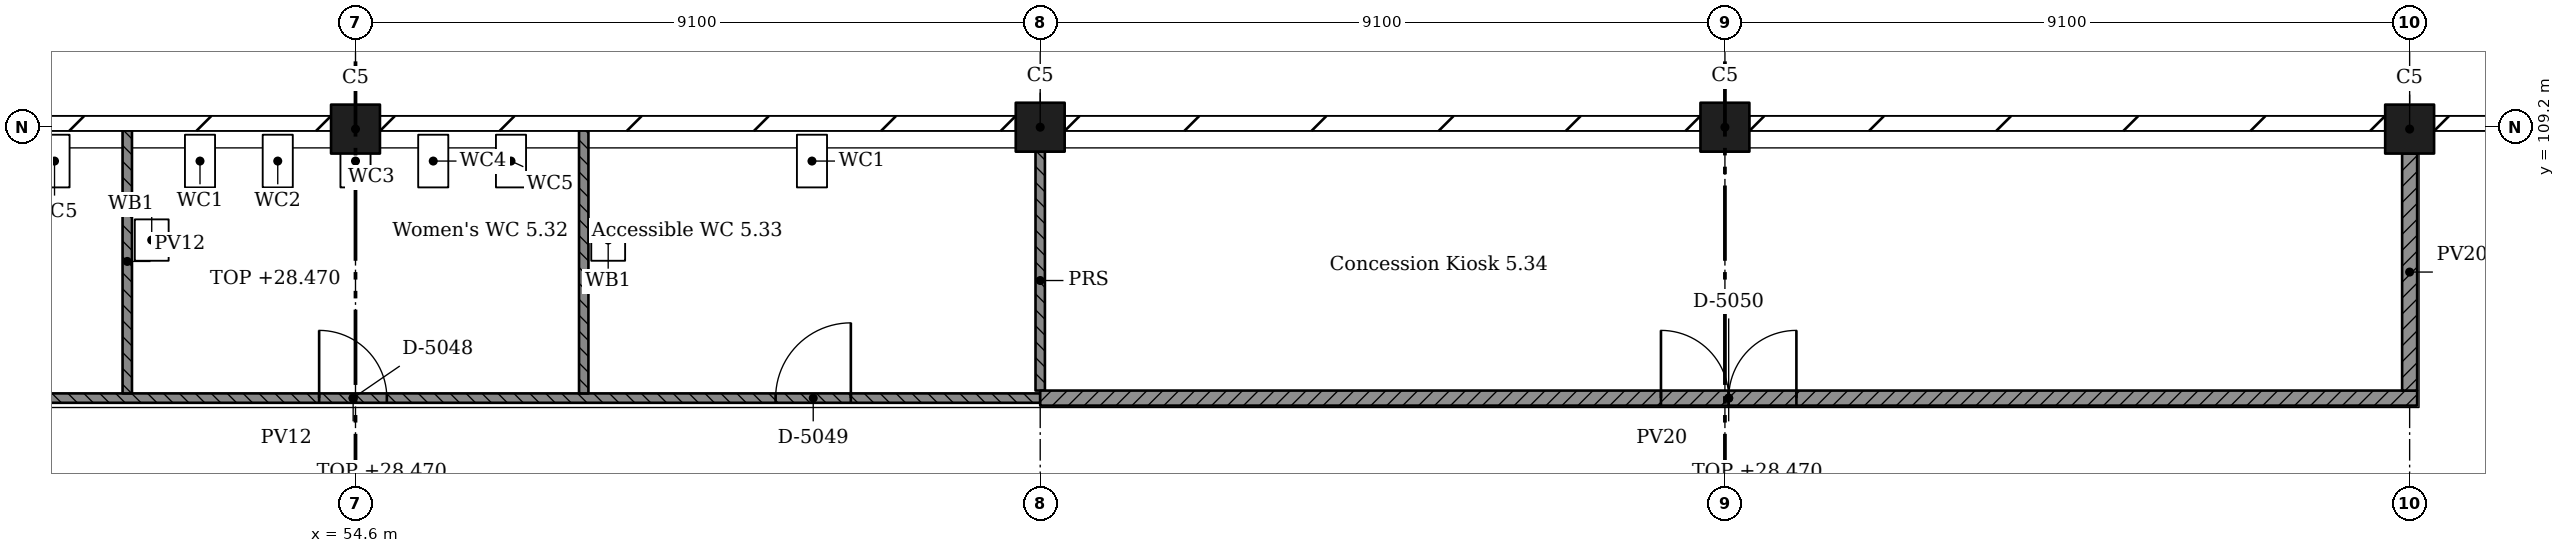
"""IFC4 building model, lengths in metres.
Left out: names, types, materials, properties, quantities, classifications, styles, units other than length and angle.
Written with IfcOpenShell. Run it as: python <this file> out.ifc"""

import sys

from ifc_helpers import new_model, si_unit, direction, frame, frame_2d, origin, origin_2d, place, context, subcontext, project, spatial, rectangle, extrude, element, fill, save


model = new_model("IFC4")
c1 = context("Model", 3, precision=1e-05, world=origin(), true_north=direction((0.0, 1.0)))
c2 = subcontext(c1, "Body", "Model", "MODEL_VIEW")
j1 = project(units=[si_unit("LENGTHUNIT", "METRE"), si_unit("PLANEANGLEUNIT", "RADIAN")], contexts=[c1])
p1 = place(None, origin())
s1 = spatial("IfcSite", under=j1, at=p1, CompositionType="ELEMENT")
p2 = place(p1, origin())
s2 = spatial("IfcBuilding", under=s1, at=p2, CompositionType="ELEMENT")
p3 = place(p2, frame((0.0, 0.0, 24.57)))
s3 = spatial("IfcBuildingStorey", under=s2, at=p3, CompositionType="ELEMENT", Elevation=24.57)
for number, where, z_axis, x_axis in (
    (1, (54.6, 109.175, 0.0), (0.0, 0.0, 1.0), (1.0, 0.0, 0.0)),
    (2, (63.7, 109.2, 0.0), (0.0, 0.0, 1.0), (1.0, 0.0, 0.0)),
    (3, (72.8, 109.2, 0.0), (0.0, 0.0, 1.0), (1.0, 0.0, 0.0)),
    (4, (81.9, 109.175, 0.0), (0.0, 0.0, 1.0), (1.0, 0.0, 0.0)),
):
    element("IfcColumn", number, at=place(p3, frame(where, z_axis=z_axis, x_axis=x_axis)), inside=s3, PredefinedType="COLUMN", context=c2, shape_type="SweptSolid", body=[
        extrude(rectangle(XDim=0.65, YDim=0.65, at=origin_2d()), origin(), (0.0, 0.0, 1.0), 4.55),
    ])
p4 = place(p3, frame((45.438, 105.6, 0.0), z_axis=(0.0, 0.0, 1.0), x_axis=(1.0, 0.0, 0.0)))
e5 = element("IfcWall", 5, at=p4, inside=s3, PredefinedType="PARTITIONING", context=c2, shape_type="SweptSolid", body=[
    extrude(rectangle(XDim=18.262, YDim=0.125, at=frame_2d((9.131, 0.0))), origin(), (0.0, 0.0, 1.0), 3.9),
])
p5 = place(p4, frame((2.65, 0.0, 0.0)))
e6 = element("IfcOpeningElement", 6, at=p5, cuts=e5, PredefinedType="OPENING", context=c2, shape_type="SweptSolid", body=[
    extrude(rectangle(XDim=0.9, YDim=2.1, at=frame_2d((0.45, 1.05))), frame((0.0, 0.073, 0.0), z_axis=(0.0, -1.0, 0.0), x_axis=(1.0, 0.0, 0.0)), (0.0, 0.0, 1.0), 0.145),
])
p6 = place(p4, frame((8.679, 0.0, 0.0)))
e7 = element("IfcOpeningElement", 7, at=p6, cuts=e5, PredefinedType="OPENING", context=c2, shape_type="SweptSolid", body=[
    extrude(rectangle(XDim=0.9, YDim=2.1, at=frame_2d((0.45, 1.05))), frame((0.0, 0.073, 0.0), z_axis=(0.0, -1.0, 0.0), x_axis=(1.0, 0.0, 0.0)), (0.0, 0.0, 1.0), 0.145),
])
p7 = place(p4, frame((14.746, 0.0, 0.0)))
e8 = element("IfcOpeningElement", 8, at=p7, cuts=e5, PredefinedType="OPENING", context=c2, shape_type="SweptSolid", body=[
    extrude(rectangle(XDim=1.0, YDim=2.1, at=frame_2d((0.5, 1.05))), frame((0.0, 0.073, 0.0), z_axis=(0.0, -1.0, 0.0), x_axis=(1.0, 0.0, 0.0)), (0.0, 0.0, 1.0), 0.145),
])
for number, where, z_axis, x_axis in (
    (9, (51.567, 109.17, 0.0), (0.0, 0.0, 1.0), (0.0, -1.0, 0.0)),
    (10, (57.633, 109.17, 0.0), (0.0, 0.0, 1.0), (0.0, -1.0, 0.0)),
):
    element("IfcWall", number, at=place(p3, frame(where, z_axis=z_axis, x_axis=x_axis)), inside=s3, PredefinedType="PARTITIONING", context=c2, shape_type="SweptSolid", body=[
        extrude(rectangle(XDim=3.507, YDim=0.125, at=frame_2d((1.754, 0.0))), origin(), (0.0, 0.0, 1.0), 3.9),
    ])
p8 = place(p3, frame((63.7, 105.6, 0.0), z_axis=(0.0, 0.0, 1.0), x_axis=(1.0, 0.0, 0.0)))
e11 = element("IfcWall", 11, at=p8, inside=s3, PredefinedType="PARTITIONING", context=c2, shape_type="SweptSolid", body=[
    extrude(rectangle(XDim=18.3, YDim=0.2, at=frame_2d((9.15, 0.0))), origin(), (0.0, 0.0, 1.0), 3.9),
])
p9 = place(p8, frame((8.25, 0.0, 0.0)))
e12 = element("IfcOpeningElement", 12, at=p9, cuts=e11, PredefinedType="OPENING", context=c2, shape_type="SweptSolid", body=[
    extrude(rectangle(XDim=1.8, YDim=2.1, at=frame_2d((0.9, 1.05))), frame((0.0, 0.11, 0.0), z_axis=(0.0, -1.0, 0.0), x_axis=(1.0, 0.0, 0.0)), (0.0, 0.0, 1.0), 0.22),
])
p10 = place(p3, frame((63.7, 108.875, 0.0), z_axis=(0.0, 0.0, 1.0), x_axis=(0.0, -1.0, 0.0)))
e13 = element("IfcWall", 13, at=p10, inside=s3, PredefinedType="PARTITIONING", context=c2, shape_type="SweptSolid", body=[
    extrude(rectangle(XDim=3.175, YDim=0.125, at=frame_2d((1.587, 0.0))), origin(), (0.0, 0.0, 1.0), 3.9),
])
p11 = place(p3, frame((81.9, 105.7, 0.0), z_axis=(0.0, 0.0, 1.0), x_axis=(0.0, 1.0, 0.0)))
e14 = element("IfcWall", 14, at=p11, inside=s3, PredefinedType="PARTITIONING", context=c2, shape_type="SweptSolid", body=[
    extrude(rectangle(XDim=3.15, YDim=0.2, at=frame_2d((1.575, 0.0))), origin(), (0.0, 0.0, 1.0), 3.9),
])
p12 = place(p6, origin())
e15 = element("IfcDoor", 15, at=p12, inside=s3, OperationType="SINGLE_SWING_RIGHT", PredefinedType="DOOR", context=c2, shape_type="SweptSolid", body=[
    extrude(rectangle(XDim=0.9, YDim=2.1, at=frame_2d((0.45, 1.05))), frame((0.0, 0.025, 0.0), z_axis=(0.0, -1.0, 0.0), x_axis=(1.0, 0.0, 0.0)), (0.0, 0.0, 1.0), 0.05),
])
fill(e7, e15)
p13 = place(p7, origin())
e16 = element("IfcDoor", 16, at=p13, inside=s3, OperationType="SINGLE_SWING_LEFT", PredefinedType="DOOR", context=c2, shape_type="SweptSolid", body=[
    extrude(rectangle(XDim=1.0, YDim=2.1, at=frame_2d((0.5, 1.05))), frame((0.0, 0.025, 0.0), z_axis=(0.0, -1.0, 0.0), x_axis=(1.0, 0.0, 0.0)), (0.0, 0.0, 1.0), 0.05),
])
fill(e8, e16)
p14 = place(p9, origin())
e17 = element("IfcDoor", 17, at=p14, inside=s3, OperationType="DOUBLE_DOOR_SINGLE_SWING", PredefinedType="DOOR", context=c2, shape_type="SweptSolid", body=[
    extrude(rectangle(XDim=1.8, YDim=2.1, at=frame_2d((0.9, 1.05))), frame((0.0, 0.025, 0.0), z_axis=(0.0, -1.0, 0.0), x_axis=(1.0, 0.0, 0.0)), (0.0, 0.0, 1.0), 0.05),
])
fill(e12, e17)
save(model, sys.argv[1])
